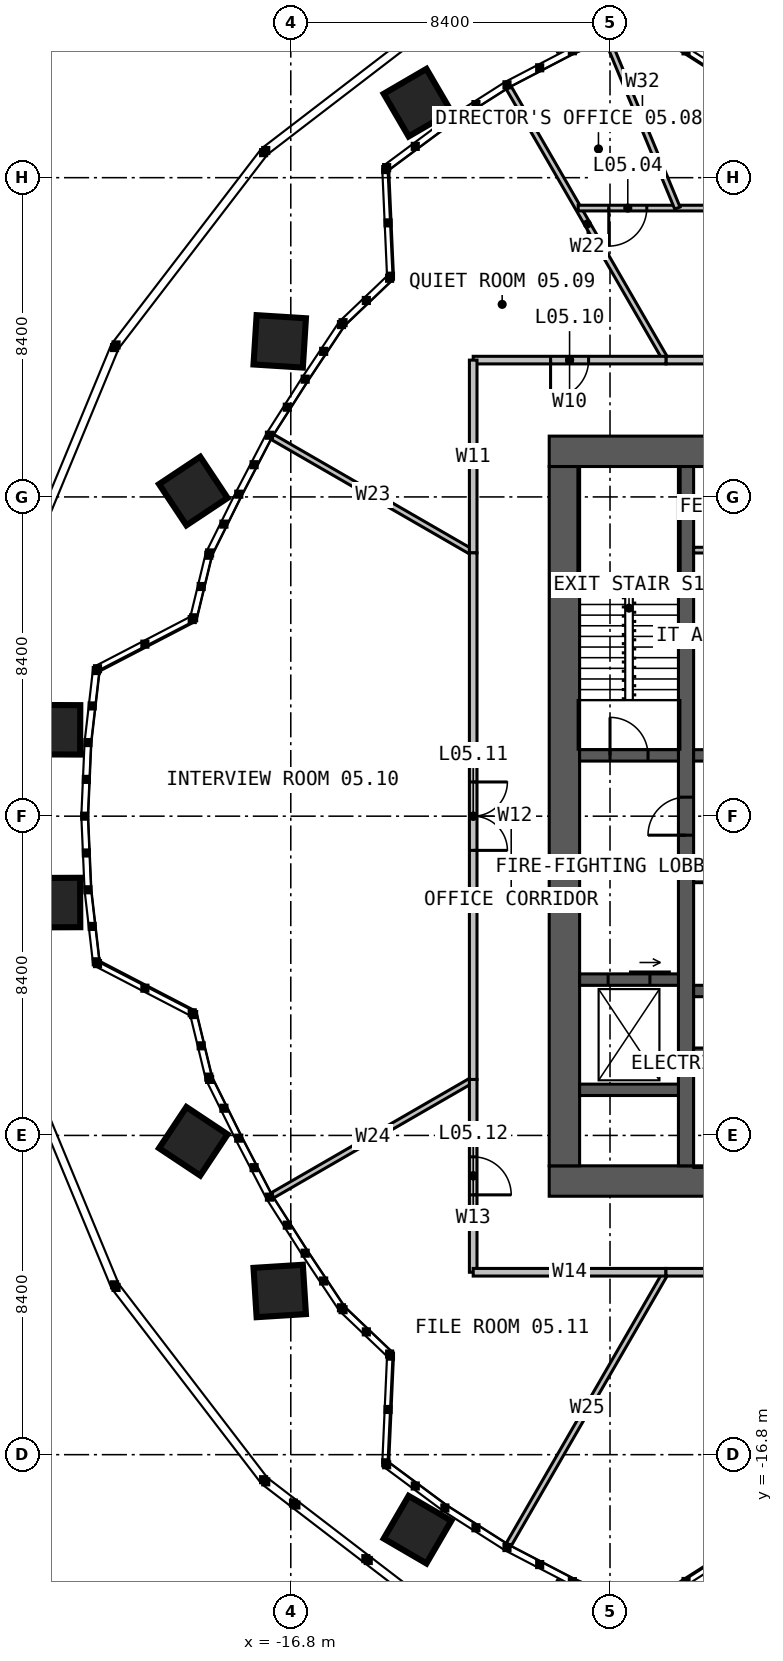
"""IFC4 building model, lengths in metres.
Left out: names, types, materials, properties, quantities, classifications, styles, units other than length and angle.
Written with IfcOpenShell. Run it as: python <this file> out.ifc"""

import sys

from ifc_helpers import new_model, si_unit, direction, frame, frame_2d, origin, place, context, subcontext, project, spatial, rectangle, extrude, element, fill, save


model = new_model("IFC4")
c1 = context("Model", 3, precision=1e-05, world=origin(), true_north=direction((0.0, 1.0)))
c2 = subcontext(c1, "Body", "Model", "MODEL_VIEW")
j1 = project(units=[si_unit("LENGTHUNIT", "METRE"), si_unit("PLANEANGLEUNIT", "RADIAN")], contexts=[c1])
p1 = place(None, origin())
s1 = spatial("IfcSite", under=j1, at=p1, CompositionType="ELEMENT")
p2 = place(p1, origin())
s2 = spatial("IfcBuilding", under=s1, at=p2, CompositionType="ELEMENT")
p3 = place(p2, frame((0.0, 0.0, 25.0)))
s3 = spatial("IfcBuildingStorey", under=s2, at=p3, CompositionType="ELEMENT", Elevation=25.0)
p4 = place(p3, frame((-10.0, 9.6, 0.0), z_axis=(0.0, 0.0, 1.0), x_axis=(1.0, 0.0, 0.0)))
e1 = element("IfcWall", 1, at=p4, inside=s3, PredefinedType="SOLIDWALL", context=c2, shape_type="SweptSolid", body=[
    extrude(rectangle(XDim=20.0, YDim=0.8, at=frame_2d((10.0, 0.0))), origin(), (0.0, 0.0, 1.0), 4.0),
])
p5 = place(p4, frame((9.4, 0.0, 0.0)))
e2 = element("IfcOpeningElement", 2, at=p5, cuts=e1, PredefinedType="OPENING", context=c2, shape_type="SweptSolid", body=[
    extrude(rectangle(XDim=1.2, YDim=2.2, at=frame_2d((0.6, 1.1))), frame((0.0, 0.41, 0.0), z_axis=(0.0, -1.0, 0.0), x_axis=(1.0, 0.0, 0.0)), (0.0, 0.0, 1.0), 0.82),
])
p6 = place(p3, frame((10.0, -9.6, 0.0), z_axis=(0.0, 0.0, 1.0), x_axis=(-1.0, 0.0, 0.0)))
e3 = element("IfcWall", 3, at=p6, inside=s3, PredefinedType="SOLIDWALL", context=c2, shape_type="SweptSolid", body=[
    extrude(rectangle(XDim=20.0, YDim=0.8, at=frame_2d((10.0, 0.0))), origin(), (0.0, 0.0, 1.0), 4.0),
])
p7 = place(p6, frame((6.875, 0.0, 0.0)))
e4 = element("IfcOpeningElement", 4, at=p7, cuts=e3, PredefinedType="OPENING", context=c2, shape_type="SweptSolid", body=[
    extrude(rectangle(XDim=1.2, YDim=2.2, at=frame_2d((0.6, 1.1))), frame((0.0, 0.41, 0.0), z_axis=(0.0, -1.0, 0.0), x_axis=(1.0, 0.0, 0.0)), (0.0, 0.0, 1.0), 0.82),
])
p8 = place(p3, frame((-9.6, 9.2, 0.0), z_axis=(0.0, 0.0, 1.0), x_axis=(0.0, -1.0, 0.0)))
e5 = element("IfcWall", 5, at=p8, inside=s3, PredefinedType="SOLIDWALL", context=c2, shape_type="SweptSolid", body=[
    extrude(rectangle(XDim=18.4, YDim=0.8, at=frame_2d((9.2, 0.0))), origin(), (0.0, 0.0, 1.0), 4.0),
])
p9 = place(p3, frame((-6.4, -9.2, 0.0), z_axis=(0.0, 0.0, 1.0), x_axis=(0.0, 1.0, 0.0)))
e6 = element("IfcWall", 6, at=p9, inside=s3, PredefinedType="SOLIDWALL", context=c2, shape_type="SweptSolid", body=[
    extrude(rectangle(XDim=18.4, YDim=0.4, at=frame_2d((9.2, 0.0))), origin(), (0.0, 0.0, 1.0), 4.0),
])
p10 = place(p9, frame((8.7, 0.0, 0.0)))
e7 = element("IfcOpeningElement", 7, at=p10, cuts=e6, PredefinedType="OPENING", context=c2, shape_type="SweptSolid", body=[
    extrude(rectangle(XDim=1.0, YDim=2.2, at=frame_2d((0.5, 1.1))), frame((0.0, 0.21, 0.0), z_axis=(0.0, -1.0, 0.0), x_axis=(1.0, 0.0, 0.0)), (0.0, 0.0, 1.0), 0.42),
])
p11 = place(p3, frame((-6.2, 1.6, 0.0), z_axis=(0.0, 0.0, 1.0), x_axis=(1.0, 0.0, 0.0)))
e8 = element("IfcWall", 8, at=p11, inside=s3, PredefinedType="SOLIDWALL", context=c2, shape_type="SweptSolid", body=[
    extrude(rectangle(XDim=4.85, YDim=0.3, at=frame_2d((2.425, 0.0))), origin(), (0.0, 0.0, 1.0), 4.0),
])
p12 = place(p11, frame((0.625, 0.0, 0.0)))
e9 = element("IfcOpeningElement", 9, at=p12, cuts=e8, PredefinedType="OPENING", context=c2, shape_type="SweptSolid", body=[
    extrude(rectangle(XDim=1.1, YDim=2.2, at=frame_2d((0.55, 1.1))), frame((0.0, 0.16, 0.0), z_axis=(0.0, -1.0, 0.0), x_axis=(1.0, 0.0, 0.0)), (0.0, 0.0, 1.0), 0.32),
])
p13 = place(p11, frame((3.15, 0.0, 0.0)))
e10 = element("IfcOpeningElement", 10, at=p13, cuts=e8, PredefinedType="OPENING", context=c2, shape_type="SweptSolid", body=[
    extrude(rectangle(XDim=1.1, YDim=2.2, at=frame_2d((0.55, 1.1))), frame((0.0, 0.16, 0.0), z_axis=(0.0, -1.0, 0.0), x_axis=(1.0, 0.0, 0.0)), (0.0, 0.0, 1.0), 0.32),
])
p14 = place(p3, frame((-6.2, 4.6, 0.0), z_axis=(0.0, 0.0, 1.0), x_axis=(1.0, 0.0, 0.0)))
e11 = element("IfcWall", 11, at=p14, inside=s3, PredefinedType="SOLIDWALL", context=c2, shape_type="SweptSolid", body=[
    extrude(rectangle(XDim=4.85, YDim=0.3, at=frame_2d((2.425, 0.0))), origin(), (0.0, 0.0, 1.0), 4.0),
])
for number, where, z_axis, x_axis in (
    (12, (-6.2, -1.6, 0.0), (0.0, 0.0, 1.0), (1.0, 0.0, 0.0)),
    (13, (-6.2, -4.6, 0.0), (0.0, 0.0, 1.0), (1.0, 0.0, 0.0)),
):
    element("IfcWall", number, at=place(p3, frame(where, z_axis=z_axis, x_axis=x_axis)), inside=s3, PredefinedType="SOLIDWALL", context=c2, shape_type="SweptSolid", body=[
        extrude(rectangle(XDim=7.4, YDim=0.3, at=frame_2d((3.7, 0.0))), origin(), (0.0, 0.0, 1.0), 4.0),
    ])
p15 = place(p3, frame((-6.2, -6.2, 0.0), z_axis=(0.0, 0.0, 1.0), x_axis=(1.0, 0.0, 0.0)))
e14 = element("IfcWall", 14, at=p15, inside=s3, PredefinedType="SOLIDWALL", context=c2, shape_type="SweptSolid", body=[
    extrude(rectangle(XDim=7.4, YDim=0.2, at=frame_2d((3.7, 0.0))), origin(), (0.0, 0.0, 1.0), 4.0),
])
p16 = place(p3, frame((-9.2, 1.6, 0.0), z_axis=(0.0, 0.0, 1.0), x_axis=(1.0, 0.0, 0.0)))
e15 = element("IfcWall", 15, at=p16, inside=s3, PredefinedType="SOLIDWALL", context=c2, shape_type="SweptSolid", body=[
    extrude(rectangle(XDim=2.6, YDim=0.3, at=frame_2d((1.3, 0.0))), origin(), (0.0, 0.0, 1.0), 4.0),
])
p17 = place(p16, frame((0.8, 0.0, 0.0)))
e16 = element("IfcOpeningElement", 16, at=p17, cuts=e15, PredefinedType="OPENING", context=c2, shape_type="SweptSolid", body=[
    extrude(rectangle(XDim=1.0, YDim=2.2, at=frame_2d((0.5, 1.1))), frame((0.0, 0.16, 0.0), z_axis=(0.0, -1.0, 0.0), x_axis=(1.0, 0.0, 0.0)), (0.0, 0.0, 1.0), 0.32),
])
p18 = place(p3, frame((-9.2, -4.3, 0.0), z_axis=(0.0, 0.0, 1.0), x_axis=(1.0, 0.0, 0.0)))
e17 = element("IfcWall", 17, at=p18, inside=s3, PredefinedType="SOLIDWALL", context=c2, shape_type="SweptSolid", body=[
    extrude(rectangle(XDim=2.6, YDim=0.3, at=frame_2d((1.3, 0.0))), origin(), (0.0, 0.0, 1.0), 4.0),
])
p19 = place(p18, frame((0.75, 0.0, 0.0)))
e18 = element("IfcOpeningElement", 18, at=p19, cuts=e17, PredefinedType="OPENING", context=c2, shape_type="SweptSolid", body=[
    extrude(rectangle(XDim=1.1, YDim=2.2, at=frame_2d((0.55, 1.1))), frame((0.0, 0.16, 0.0), z_axis=(0.0, -1.0, 0.0), x_axis=(1.0, 0.0, 0.0)), (0.0, 0.0, 1.0), 0.32),
])
p20 = place(p3, frame((-9.2, -7.2, 0.0), z_axis=(0.0, 0.0, 1.0), x_axis=(1.0, 0.0, 0.0)))
e19 = element("IfcWall", 19, at=p20, inside=s3, PredefinedType="SOLIDWALL", context=c2, shape_type="SweptSolid", body=[
    extrude(rectangle(XDim=2.6, YDim=0.3, at=frame_2d((1.3, 0.0))), origin(), (0.0, 0.0, 1.0), 4.0),
])
p21 = place(p3, frame((-6.2, 7.0, 0.0), z_axis=(0.0, 0.0, 1.0), x_axis=(1.0, 0.0, 0.0)))
e20 = element("IfcWall", 20, at=p21, inside=s3, PredefinedType="PARTITIONING", context=c2, shape_type="SweptSolid", body=[
    extrude(rectangle(XDim=3.225, YDim=0.15, at=frame_2d((1.612, 0.0))), origin(), (0.0, 0.0, 1.0), 3.75),
])
p22 = place(p3, frame((-6.928, 12.0, 0.0), z_axis=(0.0, 0.0, 1.0), x_axis=(-0.499988970207, 0.866031771745, 0.0)))
e21 = element("IfcWall", 21, at=p22, inside=s3, PredefinedType="PARTITIONING", context=c2, shape_type="SweptSolid", body=[
    extrude(rectangle(XDim=8.273, YDim=0.15, at=frame_2d((4.137, 0.0))), origin(), (0.0, 0.0, 1.0), 2.79),
])
for number, where, z_axis, x_axis in (
    (22, (-12.0, 6.928, 0.0), (0.0, 0.0, 1.0), (-0.866, 0.5, 0.0)),
    (23, (-12.0, -6.928, 0.0), (0.0, 0.0, 1.0), (-0.866, -0.5, 0.0)),
):
    element("IfcWall", number, at=place(p3, frame(where, z_axis=z_axis, x_axis=x_axis)), inside=s3, PredefinedType="PARTITIONING", context=c2, shape_type="SweptSolid", body=[
        extrude(rectangle(XDim=6.099, YDim=0.15, at=frame_2d((3.05, 0.0))), origin(), (0.0, 0.0, 1.0), 2.79),
    ])
p23 = place(p3, frame((-6.928, -12.0, 0.0), z_axis=(0.0, 0.0, 1.0), x_axis=(-0.499988970207, -0.866031771745, 0.0)))
e24 = element("IfcWall", 24, at=p23, inside=s3, PredefinedType="PARTITIONING", context=c2, shape_type="SweptSolid", body=[
    extrude(rectangle(XDim=8.273, YDim=0.15, at=frame_2d((4.137, 0.0))), origin(), (0.0, 0.0, 1.0), 2.79),
])
p24 = place(p3, frame((4.287, 16.0, 0.0), z_axis=(0.0, 0.0, 1.0), x_axis=(-1.0, 0.0, 0.0)))
e25 = element("IfcWall", 25, at=p24, inside=s3, PredefinedType="PARTITIONING", context=c2, shape_type="SweptSolid", body=[
    extrude(rectangle(XDim=13.525, YDim=0.15, at=frame_2d((6.762, 0.0))), origin(), (0.0, 0.0, 1.0), 2.79),
])
p25 = place(p24, frame((1.644, 0.0, 0.0)))
e26 = element("IfcOpeningElement", 26, at=p25, cuts=e25, PredefinedType="OPENING", context=c2, shape_type="SweptSolid", body=[
    extrude(rectangle(XDim=1.0, YDim=2.2, at=frame_2d((0.5, 1.1))), frame((0.0, 0.085, 0.0), z_axis=(0.0, -1.0, 0.0), x_axis=(1.0, 0.0, 0.0)), (0.0, 0.0, 1.0), 0.17),
])
p26 = place(p24, frame((7.101, 0.0, 0.0)))
e27 = element("IfcOpeningElement", 27, at=p26, cuts=e25, PredefinedType="OPENING", context=c2, shape_type="SweptSolid", body=[
    extrude(rectangle(XDim=1.0, YDim=2.2, at=frame_2d((0.5, 1.1))), frame((0.0, 0.085, 0.0), z_axis=(0.0, -1.0, 0.0), x_axis=(1.0, 0.0, 0.0)), (0.0, 0.0, 1.0), 0.17),
])
p27 = place(p24, frame((11.72, 0.0, 0.0)))
e28 = element("IfcOpeningElement", 28, at=p27, cuts=e25, PredefinedType="OPENING", context=c2, shape_type="SweptSolid", body=[
    extrude(rectangle(XDim=1.0, YDim=2.2, at=frame_2d((0.5, 1.1))), frame((0.0, 0.085, 0.0), z_axis=(0.0, -1.0, 0.0), x_axis=(1.0, 0.0, 0.0)), (0.0, 0.0, 1.0), 0.17),
])
p28 = place(p3, frame((-6.627, 16.0, 0.0), z_axis=(0.0, 0.0, 1.0), x_axis=(-0.382688295595, 0.92387751808, 0.0)))
e29 = element("IfcWall", 29, at=p28, inside=s3, PredefinedType="PARTITIONING", context=c2, shape_type="SweptSolid", body=[
    extrude(rectangle(XDim=4.806, YDim=0.15, at=frame_2d((2.403, 0.0))), origin(), (0.0, 0.0, 1.0), 2.79),
])
p29 = place(p3, frame((3.215, 12.0, 0.0), z_axis=(0.0, 0.0, 1.0), x_axis=(-1.0, 0.0, 0.0)))
e30 = element("IfcWall", 30, at=p29, inside=s3, PredefinedType="PARTITIONING", context=c2, shape_type="SweptSolid", body=[
    extrude(rectangle(XDim=10.144, YDim=0.2, at=frame_2d((5.072, 0.0))), origin(), (0.0, 0.0, 1.0), 3.8),
])
p30 = place(p29, frame((4.172, 0.0, 0.0)))
e31 = element("IfcOpeningElement", 31, at=p30, cuts=e30, PredefinedType="OPENING", context=c2, shape_type="SweptSolid", body=[
    extrude(rectangle(XDim=1.8, YDim=2.2, at=frame_2d((0.9, 1.1))), frame((0.0, 0.11, 0.0), z_axis=(0.0, -1.0, 0.0), x_axis=(1.0, 0.0, 0.0)), (0.0, 0.0, 1.0), 0.22),
])
p31 = place(p3, frame((-6.928, 12.0, 0.0), z_axis=(0.0, 0.0, 1.0), x_axis=(-1.0, 0.0, 0.0)))
e32 = element("IfcWall", 32, at=p31, inside=s3, PredefinedType="PARTITIONING", context=c2, shape_type="SweptSolid", body=[
    extrude(rectangle(XDim=5.072, YDim=0.2, at=frame_2d((2.536, 0.0))), origin(), (0.0, 0.0, 1.0), 3.8),
])
p32 = place(p31, frame((2.036, 0.0, 0.0)))
e33 = element("IfcOpeningElement", 33, at=p32, cuts=e32, PredefinedType="OPENING", context=c2, shape_type="SweptSolid", body=[
    extrude(rectangle(XDim=1.0, YDim=2.2, at=frame_2d((0.5, 1.1))), frame((0.0, 0.11, 0.0), z_axis=(0.0, -1.0, 0.0), x_axis=(1.0, 0.0, 0.0)), (0.0, 0.0, 1.0), 0.22),
])
p33 = place(p3, frame((-12.0, 12.0, 0.0), z_axis=(0.0, 0.0, 1.0), x_axis=(0.0, -1.0, 0.0)))
e34 = element("IfcWall", 34, at=p33, inside=s3, PredefinedType="PARTITIONING", context=c2, shape_type="SweptSolid", body=[
    extrude(rectangle(XDim=5.072, YDim=0.2, at=frame_2d((2.536, 0.0))), origin(), (0.0, 0.0, 1.0), 3.8),
])
p34 = place(p3, frame((-12.0, 6.928, 0.0), z_axis=(0.0, 0.0, 1.0), x_axis=(0.0, -1.0, 0.0)))
e35 = element("IfcWall", 35, at=p34, inside=s3, PredefinedType="PARTITIONING", context=c2, shape_type="SweptSolid", body=[
    extrude(rectangle(XDim=13.856, YDim=0.2, at=frame_2d((6.928, 0.0))), origin(), (0.0, 0.0, 1.0), 3.8),
])
p35 = place(p34, frame((6.028, 0.0, 0.0)))
e36 = element("IfcOpeningElement", 36, at=p35, cuts=e35, PredefinedType="OPENING", context=c2, shape_type="SweptSolid", body=[
    extrude(rectangle(XDim=1.8, YDim=2.2, at=frame_2d((0.9, 1.1))), frame((0.0, 0.11, 0.0), z_axis=(0.0, -1.0, 0.0), x_axis=(1.0, 0.0, 0.0)), (0.0, 0.0, 1.0), 0.22),
])
p36 = place(p3, frame((-12.0, -6.928, 0.0), z_axis=(0.0, 0.0, 1.0), x_axis=(0.0, -1.0, 0.0)))
e37 = element("IfcWall", 37, at=p36, inside=s3, PredefinedType="PARTITIONING", context=c2, shape_type="SweptSolid", body=[
    extrude(rectangle(XDim=5.072, YDim=0.2, at=frame_2d((2.536, 0.0))), origin(), (0.0, 0.0, 1.0), 3.8),
])
p37 = place(p36, frame((2.036, 0.0, 0.0)))
e38 = element("IfcOpeningElement", 38, at=p37, cuts=e37, PredefinedType="OPENING", context=c2, shape_type="SweptSolid", body=[
    extrude(rectangle(XDim=1.0, YDim=2.2, at=frame_2d((0.5, 1.1))), frame((0.0, 0.11, 0.0), z_axis=(0.0, -1.0, 0.0), x_axis=(1.0, 0.0, 0.0)), (0.0, 0.0, 1.0), 0.22),
])
p38 = place(p3, frame((-12.0, -12.0, 0.0), z_axis=(0.0, 0.0, 1.0), x_axis=(1.0, 0.0, 0.0)))
e39 = element("IfcWall", 39, at=p38, inside=s3, PredefinedType="PARTITIONING", context=c2, shape_type="SweptSolid", body=[
    extrude(rectangle(XDim=5.072, YDim=0.2, at=frame_2d((2.536, 0.0))), origin(), (0.0, 0.0, 1.0), 3.8),
])
p39 = place(p3, frame((-6.928, -12.0, 0.0), z_axis=(0.0, 0.0, 1.0), x_axis=(1.0, 0.0, 0.0)))
e40 = element("IfcWall", 40, at=p39, inside=s3, PredefinedType="PARTITIONING", context=c2, shape_type="SweptSolid", body=[
    extrude(rectangle(XDim=8.508, YDim=0.2, at=frame_2d((4.254, 0.0))), origin(), (0.0, 0.0, 1.0), 3.8),
])
p40 = place(p39, frame((3.754, 0.0, 0.0)))
e41 = element("IfcOpeningElement", 41, at=p40, cuts=e40, PredefinedType="OPENING", context=c2, shape_type="SweptSolid", body=[
    extrude(rectangle(XDim=1.0, YDim=2.2, at=frame_2d((0.5, 1.1))), frame((0.0, 0.11, 0.0), z_axis=(0.0, -1.0, 0.0), x_axis=(1.0, 0.0, 0.0)), (0.0, 0.0, 1.0), 0.22),
])
p41 = place(p10, origin())
e42 = element("IfcDoor", 42, at=p41, inside=s3, OperationType="SINGLE_SWING_LEFT", PredefinedType="DOOR", context=c2, shape_type="SweptSolid", body=[
    extrude(rectangle(XDim=1.0, YDim=2.2, at=frame_2d((0.5, 1.1))), frame((0.0, 0.025, 0.0), z_axis=(0.0, -1.0, 0.0), x_axis=(1.0, 0.0, 0.0)), (0.0, 0.0, 1.0), 0.05),
])
fill(e7, e42)
p42 = place(p17, origin())
e43 = element("IfcDoor", 43, at=p42, inside=s3, OperationType="SINGLE_SWING_LEFT", PredefinedType="DOOR", context=c2, shape_type="SweptSolid", body=[
    extrude(rectangle(XDim=1.0, YDim=2.2, at=frame_2d((0.5, 1.1))), frame((0.0, 0.025, 0.0), z_axis=(0.0, -1.0, 0.0), x_axis=(1.0, 0.0, 0.0)), (0.0, 0.0, 1.0), 0.05),
])
fill(e16, e43)
p43 = place(p19, origin())
e44 = element("IfcDoor", 44, at=p43, inside=s3, OperationType="SLIDING_TO_LEFT", PredefinedType="DOOR", context=c2, shape_type="SweptSolid", body=[
    extrude(rectangle(XDim=1.1, YDim=2.2, at=frame_2d((0.55, 1.1))), frame((0.0, 0.025, 0.0), z_axis=(0.0, -1.0, 0.0), x_axis=(1.0, 0.0, 0.0)), (0.0, 0.0, 1.0), 0.05),
])
fill(e18, e44)
p44 = place(p27, origin())
e45 = element("IfcDoor", 45, at=p44, inside=s3, OperationType="SINGLE_SWING_RIGHT", PredefinedType="DOOR", context=c2, shape_type="SweptSolid", body=[
    extrude(rectangle(XDim=1.0, YDim=2.2, at=frame_2d((0.5, 1.1))), frame((0.0, 0.025, 0.0), z_axis=(0.0, -1.0, 0.0), x_axis=(1.0, 0.0, 0.0)), (0.0, 0.0, 1.0), 0.05),
])
fill(e28, e45)
p45 = place(p32, origin())
e46 = element("IfcDoor", 46, at=p45, inside=s3, OperationType="SINGLE_SWING_RIGHT", PredefinedType="DOOR", context=c2, shape_type="SweptSolid", body=[
    extrude(rectangle(XDim=1.0, YDim=2.2, at=frame_2d((0.5, 1.1))), frame((0.0, 0.025, 0.0), z_axis=(0.0, -1.0, 0.0), x_axis=(1.0, 0.0, 0.0)), (0.0, 0.0, 1.0), 0.05),
])
fill(e33, e46)
p46 = place(p35, origin())
e47 = element("IfcDoor", 47, at=p46, inside=s3, OperationType="DOUBLE_DOOR_SINGLE_SWING", PredefinedType="DOOR", context=c2, shape_type="SweptSolid", body=[
    extrude(rectangle(XDim=1.8, YDim=2.2, at=frame_2d((0.9, 1.1))), frame((0.0, 0.025, 0.0), z_axis=(0.0, -1.0, 0.0), x_axis=(1.0, 0.0, 0.0)), (0.0, 0.0, 1.0), 0.05),
])
fill(e36, e47)
p47 = place(p37, origin())
e48 = element("IfcDoor", 48, at=p47, inside=s3, OperationType="SINGLE_SWING_RIGHT", PredefinedType="DOOR", context=c2, shape_type="SweptSolid", body=[
    extrude(rectangle(XDim=1.0, YDim=2.2, at=frame_2d((0.5, 1.1))), frame((0.0, 0.025, 0.0), z_axis=(0.0, -1.0, 0.0), x_axis=(1.0, 0.0, 0.0)), (0.0, 0.0, 1.0), 0.05),
])
fill(e38, e48)
save(model, sys.argv[1])
